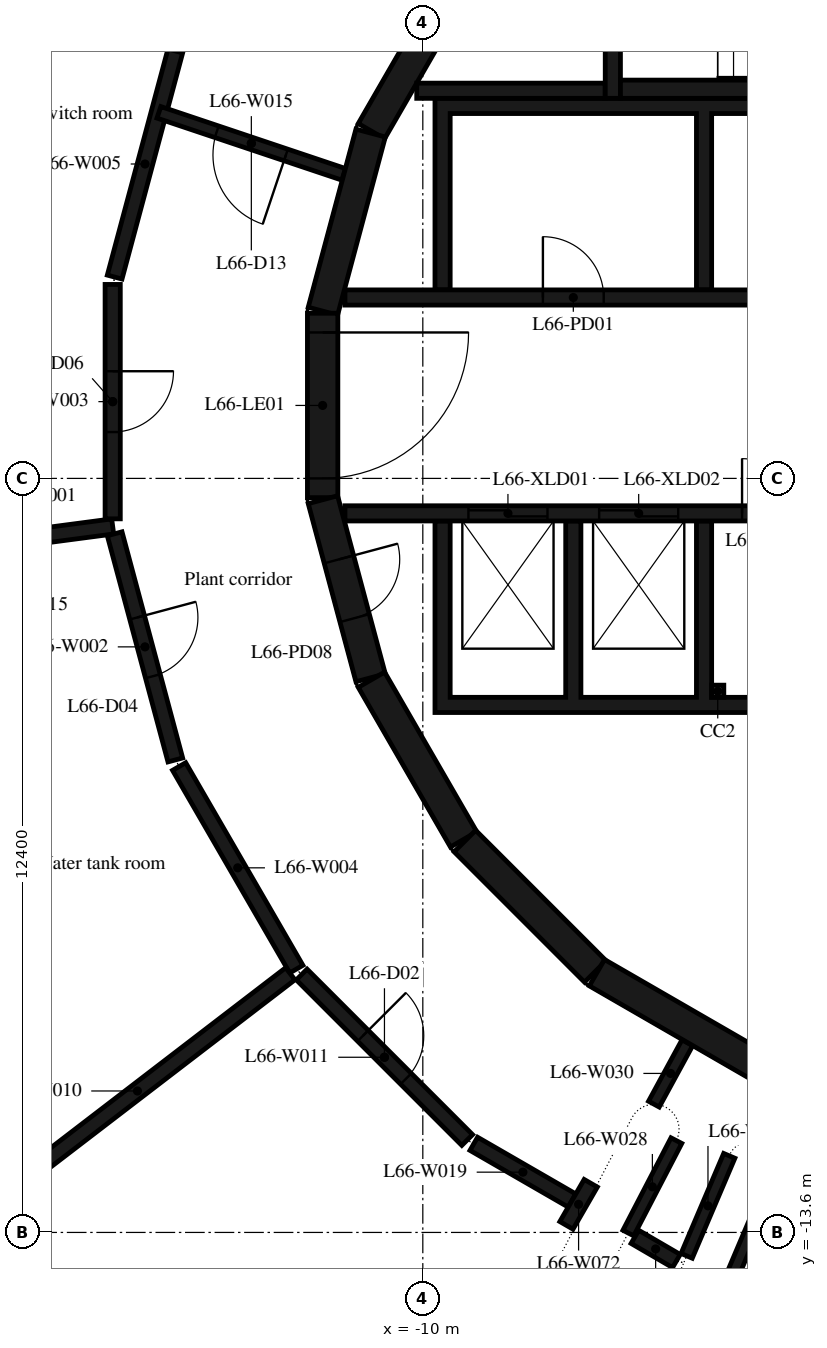
"""IFC4 building model, lengths in metres.
Left out: names, types, materials, properties, quantities, classifications, styles, units other than length and angle.
Written with IfcOpenShell. Run it as: python <this file> out.ifc"""

import sys

from ifc_helpers import new_model, si_unit, direction, frame, frame_2d, origin, origin_2d, place, context, subcontext, project, spatial, polyline, rectangle, outline, extrude, element, fill, save


model = new_model("IFC4")
c1 = context("Model", 3, precision=1e-05, world=origin(), true_north=direction((0.0, 1.0)))
c2 = subcontext(c1, "Body", "Model", "MODEL_VIEW")
j1 = project(units=[si_unit("LENGTHUNIT", "METRE"), si_unit("PLANEANGLEUNIT", "RADIAN")], contexts=[c1])
p1 = place(None, origin())
s1 = spatial("IfcSite", under=j1, at=p1, CompositionType="ELEMENT")
p2 = place(p1, origin())
s2 = spatial("IfcBuilding", under=s1, at=p2, CompositionType="ELEMENT")
p3 = place(p2, frame((0.0, 0.0, 258.2)))
s3 = spatial("IfcBuildingStorey", under=s2, at=p3, CompositionType="ELEMENT", Elevation=258.2)
p4 = place(p3, frame((-5.15, -4.7, 0.0), z_axis=(0.0, 0.0, 1.0), x_axis=(1.0, 0.0, 0.0)))
e1 = element("IfcColumn", 1, at=p4, inside=s3, PredefinedType="COLUMN", context=c2, shape_type="SweptSolid", body=[
    extrude(rectangle(XDim=0.2, YDim=0.2, at=origin_2d()), origin(), (0.0, 0.0, 1.0), 3.1),
])
for number, where, z_axis, x_axis in (
    (2, (-9.329, 7.137, 0.0), (0.0, 0.0, 1.0), (-0.5, -0.866, 0.0)),
    (3, (-10.858, 4.479, 0.0), (0.0, 0.0, 1.0), (-0.259, -0.966, 0.0)),
):
    element("IfcWall", number, at=place(p3, frame(where, z_axis=z_axis, x_axis=x_axis)), inside=s3, PredefinedType="SHEAR", context=c2, shape_type="SweptSolid", body=[
        extrude(rectangle(XDim=3.033, YDim=0.5, at=frame_2d((1.516, 0.0))), origin(), (0.0, 0.0, 1.0), 4.75),
    ])
p5 = place(p3, frame((-11.647, 1.516, 0.0), z_axis=(0.0, 0.0, 1.0), x_axis=(0.0, -1.0, 0.0)))
e4 = element("IfcWall", 4, at=p5, inside=s3, PredefinedType="SHEAR", context=c2, shape_type="SweptSolid", body=[
    extrude(rectangle(XDim=3.033, YDim=0.5, at=frame_2d((1.516, 0.0))), origin(), (0.0, 0.0, 1.0), 4.75),
])
p6 = place(p5, frame((0.316, 0.0, 0.0)))
e5 = element("IfcOpeningElement", 5, at=p6, cuts=e4, PredefinedType="OPENING", context=c2, shape_type="SweptSolid", body=[
    extrude(rectangle(XDim=2.4, YDim=2.1, at=frame_2d((1.2, 1.05))), frame((0.0, 0.26, 0.0), z_axis=(0.0, -1.0, 0.0), x_axis=(1.0, 0.0, 0.0)), (0.0, 0.0, 1.0), 0.52),
])
p7 = place(p3, frame((-11.643, -1.55, 0.0), z_axis=(0.0, 0.0, 1.0), x_axis=(0.258734743916, -0.965948410781, 0.0)))
e6 = element("IfcWall", 6, at=p7, inside=s3, PredefinedType="SHEAR", context=c2, shape_type="SweptSolid", body=[
    extrude(rectangle(XDim=3.033, YDim=0.5, at=frame_2d((1.516, 0.0))), origin(), (0.0, 0.0, 1.0), 4.75),
])
p8 = place(p7, frame((1.016, 0.0, 0.0)))
e7 = element("IfcOpeningElement", 7, at=p8, cuts=e6, PredefinedType="OPENING", context=c2, shape_type="SweptSolid", body=[
    extrude(rectangle(XDim=1.0, YDim=2.4, at=frame_2d((0.5, 1.2))), frame((0.0, 0.26, 0.0), z_axis=(0.0, -1.0, 0.0), x_axis=(1.0, 0.0, 0.0)), (0.0, 0.0, 1.0), 0.52),
])
p9 = place(p3, frame((-10.845, -4.51, 0.0), z_axis=(0.0, 0.0, 1.0), x_axis=(0.500087131594, -0.865975092491, 0.0)))
e8 = element("IfcWall", 8, at=p9, inside=s3, PredefinedType="SHEAR", context=c2, shape_type="SweptSolid", body=[
    extrude(rectangle(XDim=3.033, YDim=0.5, at=frame_2d((1.516, 0.0))), origin(), (0.0, 0.0, 1.0), 4.75),
])
p10 = place(p3, frame((-9.308, -7.164, 0.0), z_axis=(0.0, 0.0, 1.0), x_axis=(0.707106781187, -0.707106781187, 0.0)))
e9 = element("IfcWall", 9, at=p10, inside=s3, PredefinedType="SHEAR", context=c2, shape_type="SweptSolid", body=[
    extrude(rectangle(XDim=3.032, YDim=0.5, at=frame_2d((1.516, 0.0))), origin(), (0.0, 0.0, 1.0), 4.75),
])
p11 = place(p3, frame((-7.137, -9.329, 0.0), z_axis=(0.0, 0.0, 1.0), x_axis=(0.865975092491, -0.500087131594, 0.0)))
e10 = element("IfcWall", 10, at=p11, inside=s3, PredefinedType="SHEAR", context=c2, shape_type="SweptSolid", body=[
    extrude(rectangle(XDim=3.033, YDim=0.5, at=frame_2d((1.516, 0.0))), origin(), (0.0, 0.0, 1.0), 4.75),
])
p12 = place(p3, frame((-6.75, 5.2, 0.0), z_axis=(0.0, 0.0, 1.0), x_axis=(1.0, 0.0, 0.0)))
e11 = element("IfcWall", 11, at=p12, inside=s3, PredefinedType="SHEAR", context=c2, shape_type="SweptSolid", body=[
    extrude(rectangle(XDim=6.75, YDim=0.3, at=frame_2d((3.375, 0.0))), origin(), (0.0, 0.0, 1.0), 4.75),
])
p13 = place(p3, frame((-6.875, 8.97, 0.0), z_axis=(0.0, 0.0, 1.0), x_axis=(0.0, -1.0, 0.0)))
e12 = element("IfcWall", 12, at=p13, inside=s3, PredefinedType="SHEAR", context=c2, shape_type="SweptSolid", body=[
    extrude(rectangle(XDim=3.92, YDim=0.25, at=frame_2d((1.96, 0.0))), origin(), (0.0, 0.0, 1.0), 4.75),
])
p14 = place(p13, frame((1.61, 0.0, 0.0)))
e13 = element("IfcOpeningElement", 13, at=p14, cuts=e12, PredefinedType="OPENING", context=c2, shape_type="SweptSolid", body=[
    extrude(rectangle(XDim=1.2, YDim=2.1, at=frame_2d((0.6, 1.05))), frame((0.0, 0.135, 0.0), z_axis=(0.0, -1.0, 0.0), x_axis=(1.0, 0.0, 0.0)), (0.0, 0.0, 1.0), 0.27),
])
p15 = place(p3, frame((-7.0, 5.175, 0.0), z_axis=(0.0, 0.0, 1.0), x_axis=(-1.0, 0.0, 0.0)))
e14 = element("IfcWall", 14, at=p15, inside=s3, PredefinedType="SHEAR", context=c2, shape_type="SweptSolid", body=[
    extrude(rectangle(XDim=3.1, YDim=0.25, at=frame_2d((1.55, 0.0))), origin(), (0.0, 0.0, 1.0), 4.75),
])
p16 = place(p3, origin())
e15 = element("IfcWall", 15, at=p16, inside=s3, PredefinedType="SHEAR", context=c2, shape_type="SweptSolid", body=[
    extrude(outline(polyline([(-9.55, 4.8), (-5.5, 4.8), (-5.5, 1.9), (-5.25, 1.9), (-5.25, 4.8), (-1.2, 4.8), (-1.2, 1.9), (-0.95, 1.9), (-0.95, 4.8), (0.95, 4.8), (0.95, 1.9), (1.2, 1.9), (1.2, 4.8), (3.1, 4.8), (3.1, 1.9), (3.35, 1.9), (3.35, 4.8), (5.25, 4.8), (5.25, 1.9), (5.5, 1.9), (5.5, 4.8), (7.4, 4.8), (7.4, 1.9), (7.65, 1.9), (7.65, 4.8), (9.55, 4.8), (9.55, 1.9), (9.8, 1.9), (9.8, 4.8), (9.8, 5.05), (-9.8, 5.05), (-9.8, 4.8), (-9.8, 1.9), (-9.55, 1.9), (-9.55, 4.8)])), origin(), (0.0, 0.0, 1.0), 4.75),
])
p17 = place(p3, origin())
e16 = element("IfcWall", 16, at=p17, inside=s3, PredefinedType="SHEAR", context=c2, shape_type="SweptSolid", body=[
    extrude(outline(polyline([(9.8, -5.05), (9.8, -4.8), (9.8, -1.9), (9.55, -1.9), (9.55, -4.8), (7.65, -4.8), (7.65, -1.9), (7.4, -1.9), (7.4, -4.8), (5.5, -4.8), (5.5, -1.9), (5.25, -1.9), (5.25, -4.8), (3.35, -4.8), (3.35, -1.9), (3.1, -1.9), (3.1, -4.8), (1.2, -4.8), (1.2, -1.9), (0.95, -1.9), (0.95, -4.8), (-0.95, -4.8), (-0.95, -1.9), (-1.2, -1.9), (-1.2, -4.8), (-3.1, -4.8), (-3.1, -1.9), (-3.35, -1.9), (-3.35, -4.8), (-5.25, -4.8), (-5.25, -1.9), (-5.5, -1.9), (-5.5, -4.8), (-7.4, -4.8), (-7.4, -1.9), (-7.65, -1.9), (-7.65, -4.8), (-9.55, -4.8), (-9.55, -1.9), (-9.8, -1.9), (-9.8, -4.8), (-9.8, -5.05), (9.8, -5.05)])), origin(), (0.0, 0.0, 1.0), 4.75),
])
p18 = place(p3, frame((-11.28, 1.775, 0.0), z_axis=(0.0, 0.0, 1.0), x_axis=(1.0, 0.0, 0.0)))
e17 = element("IfcWall", 17, at=p18, inside=s3, PredefinedType="SHEAR", context=c2, shape_type="SweptSolid", body=[
    extrude(rectangle(XDim=14.38, YDim=0.25, at=frame_2d((7.19, 0.0))), origin(), (0.0, 0.0, 1.0), 4.75),
])
p19 = place(p18, frame((3.255, 0.0, 0.0)))
e18 = element("IfcOpeningElement", 18, at=p19, cuts=e17, PredefinedType="OPENING", context=c2, shape_type="SweptSolid", body=[
    extrude(rectangle(XDim=1.0, YDim=2.4, at=frame_2d((0.5, 1.2))), frame((0.0, 0.135, 0.0), z_axis=(0.0, -1.0, 0.0), x_axis=(1.0, 0.0, 0.0)), (0.0, 0.0, 1.0), 0.27),
])
p20 = place(p18, frame((7.555, 0.0, 0.0)))
e19 = element("IfcOpeningElement", 19, at=p20, cuts=e17, PredefinedType="OPENING", context=c2, shape_type="SweptSolid", body=[
    extrude(rectangle(XDim=1.0, YDim=2.4, at=frame_2d((0.5, 1.2))), frame((0.0, 0.135, 0.0), z_axis=(0.0, -1.0, 0.0), x_axis=(1.0, 0.0, 0.0)), (0.0, 0.0, 1.0), 0.27),
])
p21 = place(p3, frame((-11.28, -1.775, 0.0), z_axis=(0.0, 0.0, 1.0), x_axis=(1.0, 0.0, 0.0)))
e20 = element("IfcWall", 20, at=p21, inside=s3, PredefinedType="SHEAR", context=c2, shape_type="SweptSolid", body=[
    extrude(rectangle(XDim=14.38, YDim=0.25, at=frame_2d((7.19, 0.0))), origin(), (0.0, 0.0, 1.0), 4.75),
])
p22 = place(p21, frame((2.03, 0.0, 0.0)))
e21 = element("IfcOpeningElement", 21, at=p22, cuts=e20, PredefinedType="OPENING", context=c2, shape_type="SweptSolid", body=[
    extrude(rectangle(XDim=1.3, YDim=2.1, at=frame_2d((0.65, 1.05))), frame((0.0, 0.135, 0.0), z_axis=(0.0, -1.0, 0.0), x_axis=(1.0, 0.0, 0.0)), (0.0, 0.0, 1.0), 0.27),
])
p23 = place(p21, frame((4.18, 0.0, 0.0)))
e22 = element("IfcOpeningElement", 22, at=p23, cuts=e20, PredefinedType="OPENING", context=c2, shape_type="SweptSolid", body=[
    extrude(rectangle(XDim=1.3, YDim=2.1, at=frame_2d((0.65, 1.05))), frame((0.0, 0.135, 0.0), z_axis=(0.0, -1.0, 0.0), x_axis=(1.0, 0.0, 0.0)), (0.0, 0.0, 1.0), 0.27),
])
p24 = place(p21, frame((6.53, 0.0, 0.0)))
e23 = element("IfcOpeningElement", 23, at=p24, cuts=e20, PredefinedType="OPENING", context=c2, shape_type="SweptSolid", body=[
    extrude(rectangle(XDim=0.9, YDim=2.1, at=frame_2d((0.45, 1.05))), frame((0.0, 0.135, 0.0), z_axis=(0.0, -1.0, 0.0), x_axis=(1.0, 0.0, 0.0)), (0.0, 0.0, 1.0), 0.27),
])
p25 = place(p21, frame((8.68, 0.0, 0.0)))
e24 = element("IfcOpeningElement", 24, at=p25, cuts=e20, PredefinedType="OPENING", context=c2, shape_type="SweptSolid", body=[
    extrude(rectangle(XDim=0.9, YDim=2.1, at=frame_2d((0.45, 1.05))), frame((0.0, 0.135, 0.0), z_axis=(0.0, -1.0, 0.0), x_axis=(1.0, 0.0, 0.0)), (0.0, 0.0, 1.0), 0.27),
])
p26 = place(p21, frame((10.83, 0.0, 0.0)))
e25 = element("IfcOpeningElement", 25, at=p26, cuts=e20, PredefinedType="OPENING", context=c2, shape_type="SweptSolid", body=[
    extrude(rectangle(XDim=0.9, YDim=2.1, at=frame_2d((0.45, 1.05))), frame((0.0, 0.135, 0.0), z_axis=(0.0, -1.0, 0.0), x_axis=(1.0, 0.0, 0.0)), (0.0, 0.0, 1.0), 0.27),
])
p27 = place(p3, frame((-15.1, -1.99, 0.0), z_axis=(0.0, 0.0, 1.0), x_axis=(-0.991385897114, -0.130973291185, 0.0)))
e26 = element("IfcWall", 26, at=p27, inside=s3, PredefinedType="PARTITIONING", context=c2, shape_type="SweptSolid", body=[
    extrude(rectangle(XDim=2.593, YDim=0.25, at=frame_2d((1.296, 0.0))), origin(), (0.0, 0.0, 1.0), 4.75),
])
p28 = place(p3, frame((-15.068, -2.111, 0.0), z_axis=(0.0, 0.0, 1.0), x_axis=(0.259059323171, -0.965861411942, 0.0)))
e27 = element("IfcWall", 27, at=p28, inside=s3, PredefinedType="PARTITIONING", context=c2, shape_type="SweptSolid", body=[
    extrude(rectangle(XDim=3.851, YDim=0.25, at=frame_2d((1.925, 0.0))), origin(), (0.0, 0.0, 1.0), 4.75),
])
p29 = place(p28, frame((1.425, 0.0, 0.0)))
e28 = element("IfcOpeningElement", 28, at=p29, cuts=e27, PredefinedType="OPENING", context=c2, shape_type="SweptSolid", body=[
    extrude(rectangle(XDim=1.0, YDim=2.1, at=frame_2d((0.5, 1.05))), frame((0.0, 0.135, 0.0), z_axis=(0.0, -1.0, 0.0), x_axis=(1.0, 0.0, 0.0)), (0.0, 0.0, 1.0), 0.27),
])
p30 = place(p3, frame((-15.1, 1.99, 0.0), z_axis=(0.0, 0.0, 1.0), x_axis=(0.0, -1.0, 0.0)))
e29 = element("IfcWall", 29, at=p30, inside=s3, PredefinedType="PARTITIONING", context=c2, shape_type="SweptSolid", body=[
    extrude(rectangle(XDim=3.855, YDim=0.25, at=frame_2d((1.927, 0.0))), origin(), (0.0, 0.0, 1.0), 4.75),
])
p31 = place(p30, frame((1.427, 0.0, 0.0)))
e30 = element("IfcOpeningElement", 30, at=p31, cuts=e29, PredefinedType="OPENING", context=c2, shape_type="SweptSolid", body=[
    extrude(rectangle(XDim=1.0, YDim=2.1, at=frame_2d((0.5, 1.05))), frame((0.0, 0.135, 0.0), z_axis=(0.0, -1.0, 0.0), x_axis=(1.0, 0.0, 0.0)), (0.0, 0.0, 1.0), 0.27),
])
p32 = place(p3, frame((-14.007, -5.938, 0.0), z_axis=(0.0, 0.0, 1.0), x_axis=(0.500708693508, -0.865615852585, 0.0)))
e31 = element("IfcWall", 31, at=p32, inside=s3, PredefinedType="PARTITIONING", context=c2, shape_type="SweptSolid", body=[
    extrude(rectangle(XDim=3.849, YDim=0.25, at=frame_2d((1.925, 0.0))), origin(), (0.0, 0.0, 1.0), 4.75),
])
p33 = place(p3, frame((-14.07, 5.83, 0.0), z_axis=(0.0, 0.0, 1.0), x_axis=(-0.259059323171, -0.965861411942, 0.0)))
e32 = element("IfcWall", 32, at=p33, inside=s3, PredefinedType="PARTITIONING", context=c2, shape_type="SweptSolid", body=[
    extrude(rectangle(XDim=3.851, YDim=0.25, at=frame_2d((1.925, 0.0))), origin(), (0.0, 0.0, 1.0), 4.75),
])
p34 = place(p3, frame((-12.179, -9.346, 0.0), z_axis=(0.0, 0.0, 1.0), x_axis=(-0.793517039505, -0.608548032628, 0.0)))
e33 = element("IfcWall", 33, at=p34, inside=s3, PredefinedType="PARTITIONING", context=c2, shape_type="SweptSolid", body=[
    extrude(rectangle(XDim=6.335, YDim=0.25, at=frame_2d((3.168, 0.0))), origin(), (0.0, 0.0, 1.0), 4.75),
])
p35 = place(p3, frame((-11.992, -9.358, 0.0), z_axis=(0.0, 0.0, 1.0), x_axis=(0.707106781187, -0.707106781187, 0.0)))
e34 = element("IfcWall", 34, at=p35, inside=s3, PredefinedType="PARTITIONING", context=c2, shape_type="SweptSolid", body=[
    extrude(rectangle(XDim=3.849, YDim=0.25, at=frame_2d((1.925, 0.0))), origin(), (0.0, 0.0, 1.0), 4.75),
])
p36 = place(p35, frame((1.425, 0.0, 0.0)))
e35 = element("IfcOpeningElement", 35, at=p36, cuts=e34, PredefinedType="OPENING", context=c2, shape_type="SweptSolid", body=[
    extrude(rectangle(XDim=1.0, YDim=2.1, at=frame_2d((0.5, 1.05))), frame((0.0, 0.135, 0.0), z_axis=(0.0, -1.0, 0.0), x_axis=(1.0, 0.0, 0.0)), (0.0, 0.0, 1.0), 0.27),
])
p37 = place(p3, frame((-11.3, 3.8, 0.0), z_axis=(0.0, 0.0, 1.0), x_axis=(-0.94805712629, 0.318100118345, 0.0)))
e36 = element("IfcWall", 36, at=p37, inside=s3, PredefinedType="PARTITIONING", context=c2, shape_type="SweptSolid", body=[
    extrude(rectangle(XDim=3.207, YDim=0.2, at=frame_2d((1.603, 0.0))), origin(), (0.0, 0.0, 1.0), 4.75),
])
p38 = place(p37, frame((1.003, 0.0, 0.0)))
e37 = element("IfcOpeningElement", 37, at=p38, cuts=e36, PredefinedType="OPENING", context=c2, shape_type="SweptSolid", body=[
    extrude(rectangle(XDim=1.2, YDim=2.1, at=frame_2d((0.6, 1.05))), frame((0.0, 0.11, 0.0), z_axis=(0.0, -1.0, 0.0), x_axis=(1.0, 0.0, 0.0)), (0.0, 0.0, 1.0), 0.22),
])
p39 = place(p3, frame((-9.162, -12.143, 0.0), z_axis=(0.0, 0.0, 1.0), x_axis=(0.866067878235, -0.499926424876, 0.0)))
e38 = element("IfcWall", 38, at=p39, inside=s3, PredefinedType="PARTITIONING", context=c2, shape_type="SweptSolid", body=[
    extrude(rectangle(XDim=1.865, YDim=0.25, at=frame_2d((0.933, 0.0))), origin(), (0.0, 0.0, 1.0), 4.75),
])
p40 = place(p3, frame((-6.512, -13.673, 0.0), z_axis=(0.0, 0.0, 1.0), x_axis=(0.864081706907, -0.503351570762, 0.0)))
e39 = element("IfcWall", 39, at=p40, inside=s3, PredefinedType="PARTITIONING", context=c2, shape_type="SweptSolid", body=[
    extrude(rectangle(XDim=0.789, YDim=0.25, at=frame_2d((0.395, 0.0))), origin(), (0.0, 0.0, 1.0), 4.75),
])
p41 = place(p3, frame((-6.62, -13.61, 0.0), z_axis=(0.0, 0.0, 1.0), x_axis=(0.461182211336, 0.887305453577, 0.0)))
e40 = element("IfcWall", 40, at=p41, inside=s3, PredefinedType="PARTITIONING", context=c2, shape_type="SweptSolid", body=[
    extrude(rectangle(XDim=1.713, YDim=0.2, at=frame_2d((0.856, 0.0))), origin(), (0.0, 0.0, 1.0), 4.75),
])
p42 = place(p3, frame((-6.2, -11.49, 0.0), z_axis=(0.0, 0.0, 1.0), x_axis=(0.478271968214, 0.878211776521, 0.0)))
e41 = element("IfcWall", 41, at=p42, inside=s3, PredefinedType="PARTITIONING", context=c2, shape_type="SweptSolid", body=[
    extrude(rectangle(XDim=1.15, YDim=0.2, at=frame_2d((0.575, 0.0))), origin(), (0.0, 0.0, 1.0), 4.75),
])
p43 = place(p3, frame((-4.96, -12.34, 0.0), z_axis=(0.0, 0.0, 1.0), x_axis=(-0.391990471088, -0.919969276974, 0.0)))
e42 = element("IfcWall", 42, at=p43, inside=s3, PredefinedType="PARTITIONING", context=c2, shape_type="SweptSolid", body=[
    extrude(rectangle(XDim=1.788, YDim=0.2, at=frame_2d((0.894, 0.0))), origin(), (0.0, 0.0, 1.0), 4.75),
])
p44 = place(p3, frame((-4.91, -14.31, 0.0), z_axis=(0.0, 0.0, 1.0), x_axis=(0.390497378465, 0.920604039429, 0.0)))
e43 = element("IfcWall", 43, at=p44, inside=s3, PredefinedType="PARTITIONING", context=c2, shape_type="SweptSolid", body=[
    extrude(rectangle(XDim=1.792, YDim=0.2, at=frame_2d((0.896, 0.0))), origin(), (0.0, 0.0, 1.0), 4.75),
])
p45 = place(p3, frame((-7.638, -13.484, 0.0), z_axis=(0.0, 0.0, 1.0), x_axis=(0.499880961361, 0.866094119867, 0.0)))
e44 = element("IfcWall", 44, at=p45, inside=s3, PredefinedType="PARTITIONING", context=c2, shape_type="SweptSolid", body=[
    extrude(rectangle(XDim=0.8, YDim=0.25, at=frame_2d((0.4, 0.0))), origin(), (0.0, 0.0, 1.0), 4.75),
])
p46 = place(p6, origin())
e45 = element("IfcDoor", 45, at=p46, inside=s3, OperationType="DOUBLE_DOOR_SINGLE_SWING", PredefinedType="DOOR", context=c2, shape_type="SweptSolid", body=[
    extrude(rectangle(XDim=2.4, YDim=2.1, at=frame_2d((1.2, 1.05))), frame((0.0, 0.025, 0.0), z_axis=(0.0, -1.0, 0.0), x_axis=(1.0, 0.0, 0.0)), (0.0, 0.0, 1.0), 0.05),
])
fill(e5, e45)
p47 = place(p22, origin())
e46 = element("IfcDoor", 46, at=p47, inside=s3, OperationType="DOUBLE_DOOR_SLIDING", PredefinedType="DOOR", context=c2, shape_type="SweptSolid", body=[
    extrude(rectangle(XDim=1.3, YDim=2.1, at=frame_2d((0.65, 1.05))), frame((0.0, 0.025, 0.0), z_axis=(0.0, -1.0, 0.0), x_axis=(1.0, 0.0, 0.0)), (0.0, 0.0, 1.0), 0.05),
])
fill(e21, e46)
p48 = place(p23, origin())
e47 = element("IfcDoor", 47, at=p48, inside=s3, OperationType="DOUBLE_DOOR_SLIDING", PredefinedType="DOOR", context=c2, shape_type="SweptSolid", body=[
    extrude(rectangle(XDim=1.3, YDim=2.1, at=frame_2d((0.65, 1.05))), frame((0.0, 0.025, 0.0), z_axis=(0.0, -1.0, 0.0), x_axis=(1.0, 0.0, 0.0)), (0.0, 0.0, 1.0), 0.05),
])
fill(e22, e47)
p49 = place(p19, origin())
e48 = element("IfcDoor", 48, at=p49, inside=s3, OperationType="SINGLE_SWING_RIGHT", PredefinedType="DOOR", context=c2, shape_type="SweptSolid", body=[
    extrude(rectangle(XDim=1.0, YDim=2.4, at=frame_2d((0.5, 1.2))), frame((0.0, 0.025, 0.0), z_axis=(0.0, -1.0, 0.0), x_axis=(1.0, 0.0, 0.0)), (0.0, 0.0, 1.0), 0.05),
])
fill(e18, e48)
p50 = place(p24, origin())
e49 = element("IfcDoor", 49, at=p50, inside=s3, OperationType="SINGLE_SWING_LEFT", PredefinedType="DOOR", context=c2, shape_type="SweptSolid", body=[
    extrude(rectangle(XDim=0.9, YDim=2.1, at=frame_2d((0.45, 1.05))), frame((0.0, 0.025, 0.0), z_axis=(0.0, -1.0, 0.0), x_axis=(1.0, 0.0, 0.0)), (0.0, 0.0, 1.0), 0.05),
])
fill(e23, e49)
p51 = place(p8, origin())
e50 = element("IfcDoor", 50, at=p51, inside=s3, OperationType="SINGLE_SWING_RIGHT", PredefinedType="DOOR", context=c2, shape_type="SweptSolid", body=[
    extrude(rectangle(XDim=1.0, YDim=2.4, at=frame_2d((0.5, 1.2))), frame((0.0, 0.025, 0.0), z_axis=(0.0, -1.0, 0.0), x_axis=(1.0, 0.0, 0.0)), (0.0, 0.0, 1.0), 0.05),
])
fill(e7, e50)
p52 = place(p36, origin())
e51 = element("IfcDoor", 51, at=p52, inside=s3, OperationType="SINGLE_SWING_LEFT", PredefinedType="DOOR", context=c2, shape_type="SweptSolid", body=[
    extrude(rectangle(XDim=1.0, YDim=2.1, at=frame_2d((0.5, 1.05))), frame((0.0, 0.025, 0.0), z_axis=(0.0, -1.0, 0.0), x_axis=(1.0, 0.0, 0.0)), (0.0, 0.0, 1.0), 0.05),
])
fill(e35, e51)
p53 = place(p29, origin())
e52 = element("IfcDoor", 52, at=p53, inside=s3, OperationType="SINGLE_SWING_LEFT", PredefinedType="DOOR", context=c2, shape_type="SweptSolid", body=[
    extrude(rectangle(XDim=1.0, YDim=2.1, at=frame_2d((0.5, 1.05))), frame((0.0, 0.025, 0.0), z_axis=(0.0, -1.0, 0.0), x_axis=(1.0, 0.0, 0.0)), (0.0, 0.0, 1.0), 0.05),
])
fill(e28, e52)
p54 = place(p31, origin())
e53 = element("IfcDoor", 53, at=p54, inside=s3, OperationType="SINGLE_SWING_LEFT", PredefinedType="DOOR", context=c2, shape_type="SweptSolid", body=[
    extrude(rectangle(XDim=1.0, YDim=2.1, at=frame_2d((0.5, 1.05))), frame((0.0, 0.025, 0.0), z_axis=(0.0, -1.0, 0.0), x_axis=(1.0, 0.0, 0.0)), (0.0, 0.0, 1.0), 0.05),
])
fill(e30, e53)
p55 = place(p38, origin())
e54 = element("IfcDoor", 54, at=p55, inside=s3, OperationType="SINGLE_SWING_LEFT", PredefinedType="DOOR", context=c2, shape_type="SweptSolid", body=[
    extrude(rectangle(XDim=1.2, YDim=2.1, at=frame_2d((0.6, 1.05))), frame((0.0, 0.025, 0.0), z_axis=(0.0, -1.0, 0.0), x_axis=(1.0, 0.0, 0.0)), (0.0, 0.0, 1.0), 0.05),
])
fill(e37, e54)
save(model, sys.argv[1])
